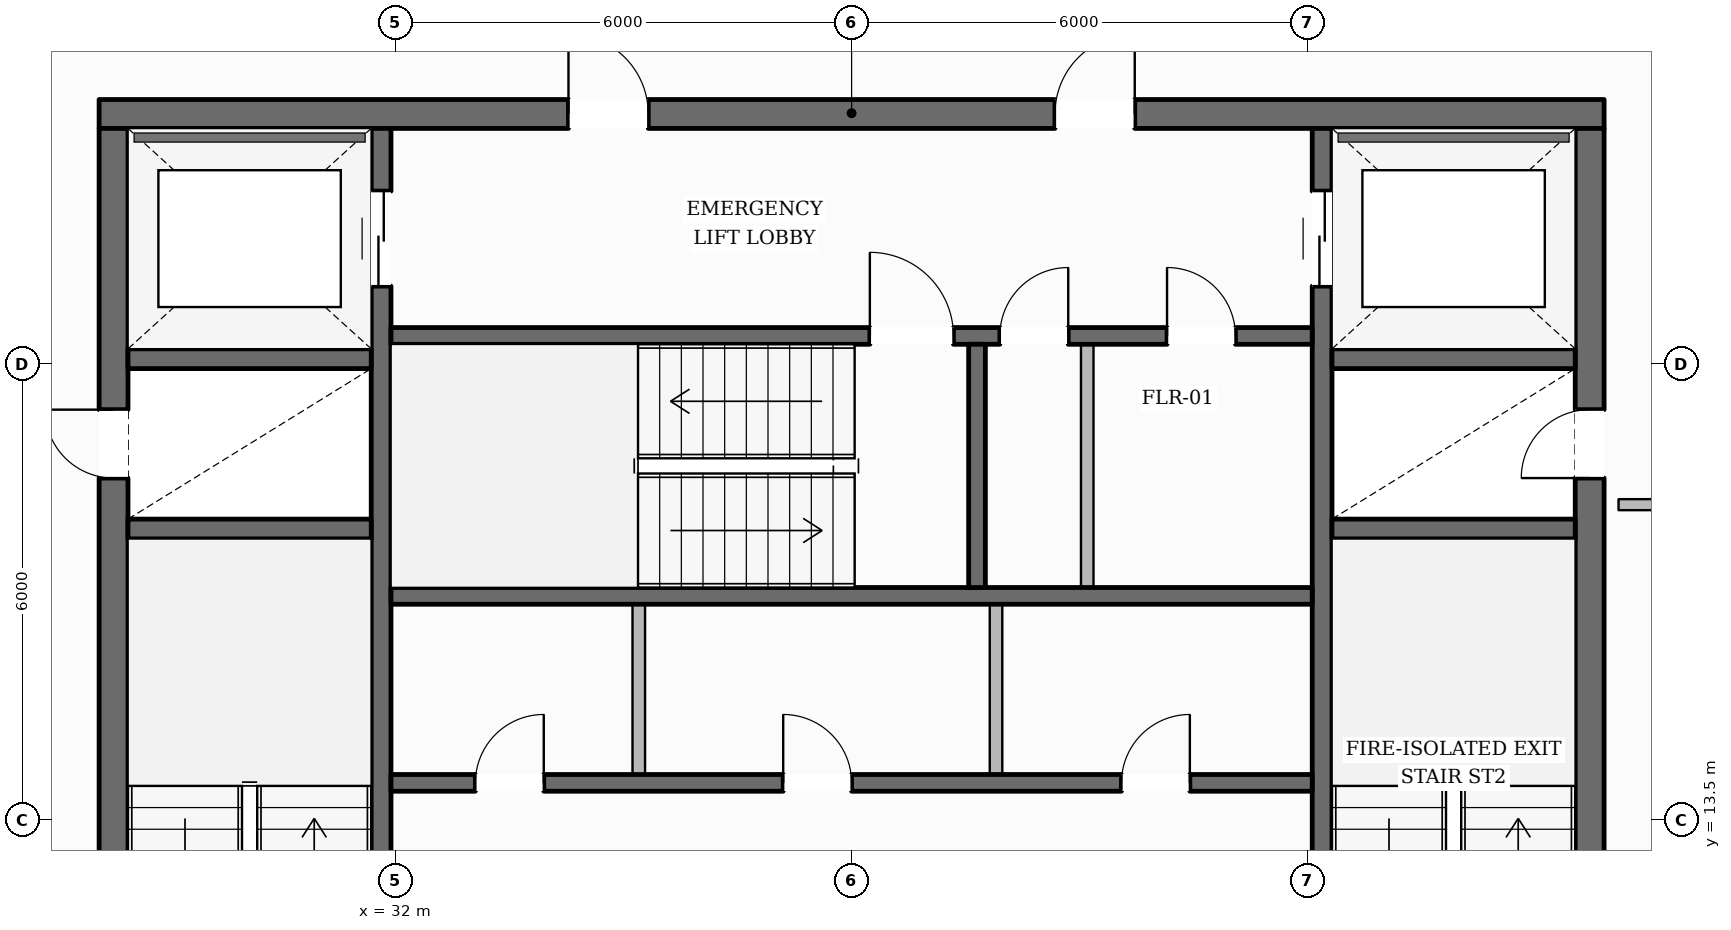
"""IFC4 building model, lengths in metres.
Left out: names, types, materials, properties, quantities, classifications, styles, units other than length and angle.
Written with IfcOpenShell. Run it as: python <this file> out.ifc"""

import sys

from ifc_helpers import new_model, si_unit, direction, frame, frame_2d, origin, place, context, subcontext, project, spatial, rectangle, extrude, element, fill, save


model = new_model("IFC4")
c1 = context("Model", 3, precision=1e-05, world=origin(), true_north=direction((0.0, 1.0)))
c2 = subcontext(c1, "Body", "Model", "MODEL_VIEW")
j1 = project(units=[si_unit("LENGTHUNIT", "METRE"), si_unit("PLANEANGLEUNIT", "RADIAN")], contexts=[c1])
p1 = place(None, origin())
s1 = spatial("IfcSite", under=j1, at=p1, CompositionType="ELEMENT")
p2 = place(p1, origin())
s2 = spatial("IfcBuilding", under=s1, at=p2, CompositionType="ELEMENT")
p3 = place(p2, frame((0.0, 0.0, 278.0)))
s3 = spatial("IfcBuildingStorey", under=s2, at=p3, CompositionType="ELEMENT", Elevation=278.0)
p4 = place(p3, frame((28.1, 22.79, 0.0), z_axis=(0.0, 0.0, 1.0), x_axis=(1.0, 0.0, 0.0)))
e1 = element("IfcWall", 1, at=p4, inside=s3, PredefinedType="SOLIDWALL", context=c2, shape_type="SweptSolid", body=[
    extrude(rectangle(XDim=19.8, YDim=0.38, at=frame_2d((9.9, 0.0))), origin(), (0.0, 0.0, 1.0), 3.61),
])
p5 = place(p4, frame((6.175, 0.0, 0.0)))
e2 = element("IfcOpeningElement", 2, at=p5, cuts=e1, PredefinedType="OPENING", context=c2, shape_type="SweptSolid", body=[
    extrude(rectangle(XDim=1.05, YDim=2.15, at=frame_2d((0.525, 1.075))), frame((0.0, 0.2, 0.0), z_axis=(0.0, -1.0, 0.0), x_axis=(1.0, 0.0, 0.0)), (0.0, 0.0, 1.0), 0.4),
])
p6 = place(p4, frame((12.575, 0.0, 0.0)))
e3 = element("IfcOpeningElement", 3, at=p6, cuts=e1, PredefinedType="OPENING", context=c2, shape_type="SweptSolid", body=[
    extrude(rectangle(XDim=1.05, YDim=2.15, at=frame_2d((0.525, 1.075))), frame((0.0, 0.2, 0.0), z_axis=(0.0, -1.0, 0.0), x_axis=(1.0, 0.0, 0.0)), (0.0, 0.0, 1.0), 0.4),
])
p7 = place(p3, frame((28.29, 9.6, 0.0), z_axis=(0.0, 0.0, 1.0), x_axis=(0.0, 1.0, 0.0)))
e4 = element("IfcWall", 4, at=p7, inside=s3, PredefinedType="SOLIDWALL", context=c2, shape_type="SweptSolid", body=[
    extrude(rectangle(XDim=13.0, YDim=0.38, at=frame_2d((6.5, 0.0))), origin(), (0.0, 0.0, 1.0), 3.61),
])
p8 = place(p7, frame((0.2, 0.0, 0.0)))
e5 = element("IfcOpeningElement", 5, at=p8, cuts=e4, PredefinedType="OPENING", context=c2, shape_type="SweptSolid", body=[
    extrude(rectangle(XDim=1.1, YDim=2.15, at=frame_2d((0.55, 1.075))), frame((0.0, 0.2, 0.0), z_axis=(0.0, -1.0, 0.0), x_axis=(1.0, 0.0, 0.0)), (0.0, 0.0, 1.0), 0.4),
])
p9 = place(p7, frame((8.4, 0.0, 0.0)))
e6 = element("IfcOpeningElement", 6, at=p9, cuts=e4, PredefinedType="OPENING", context=c2, shape_type="SweptSolid", body=[
    extrude(rectangle(XDim=0.9, YDim=2.1, at=frame_2d((0.45, 1.05))), frame((0.0, 0.2, 0.0), z_axis=(0.0, -1.0, 0.0), x_axis=(1.0, 0.0, 0.0)), (0.0, 0.0, 1.0), 0.4),
])
p10 = place(p3, frame((47.71, 9.6, 0.0), z_axis=(0.0, 0.0, 1.0), x_axis=(0.0, 1.0, 0.0)))
e7 = element("IfcWall", 7, at=p10, inside=s3, PredefinedType="SOLIDWALL", context=c2, shape_type="SweptSolid", body=[
    extrude(rectangle(XDim=13.0, YDim=0.38, at=frame_2d((6.5, 0.0))), origin(), (0.0, 0.0, 1.0), 3.61),
])
p11 = place(p10, frame((0.2, 0.0, 0.0)))
e8 = element("IfcOpeningElement", 8, at=p11, cuts=e7, PredefinedType="OPENING", context=c2, shape_type="SweptSolid", body=[
    extrude(rectangle(XDim=1.1, YDim=2.15, at=frame_2d((0.55, 1.075))), frame((0.0, 0.2, 0.0), z_axis=(0.0, -1.0, 0.0), x_axis=(1.0, 0.0, 0.0)), (0.0, 0.0, 1.0), 0.4),
])
p12 = place(p10, frame((8.4, 0.0, 0.0)))
e9 = element("IfcOpeningElement", 9, at=p12, cuts=e7, PredefinedType="OPENING", context=c2, shape_type="SweptSolid", body=[
    extrude(rectangle(XDim=0.9, YDim=2.1, at=frame_2d((0.45, 1.05))), frame((0.0, 0.2, 0.0), z_axis=(0.0, -1.0, 0.0), x_axis=(1.0, 0.0, 0.0)), (0.0, 0.0, 1.0), 0.4),
])
p13 = place(p3, frame((31.81, 9.6, 0.0), z_axis=(0.0, 0.0, 1.0), x_axis=(0.0, 1.0, 0.0)))
e10 = element("IfcWall", 10, at=p13, inside=s3, PredefinedType="SHEAR", context=c2, shape_type="SweptSolid", body=[
    extrude(rectangle(XDim=13.0, YDim=0.26, at=frame_2d((6.5, 0.0))), origin(), (0.0, 0.0, 1.0), 3.61),
])
p14 = place(p13, frame((10.925, 0.0, 0.0)))
e11 = element("IfcOpeningElement", 11, at=p14, cuts=e10, PredefinedType="OPENING", context=c2, shape_type="SweptSolid", body=[
    extrude(rectangle(XDim=1.25, YDim=2.25, at=frame_2d((0.625, 1.125))), frame((0.0, 0.14, 0.0), z_axis=(0.0, -1.0, 0.0), x_axis=(1.0, 0.0, 0.0)), (0.0, 0.0, 1.0), 0.28),
])
p15 = place(p3, frame((44.19, 9.6, 0.0), z_axis=(0.0, 0.0, 1.0), x_axis=(0.0, 1.0, 0.0)))
e12 = element("IfcWall", 12, at=p15, inside=s3, PredefinedType="SHEAR", context=c2, shape_type="SweptSolid", body=[
    extrude(rectangle(XDim=13.0, YDim=0.26, at=frame_2d((6.5, 0.0))), origin(), (0.0, 0.0, 1.0), 3.61),
])
p16 = place(p15, frame((10.925, 0.0, 0.0)))
e13 = element("IfcOpeningElement", 13, at=p16, cuts=e12, PredefinedType="OPENING", context=c2, shape_type="SweptSolid", body=[
    extrude(rectangle(XDim=1.25, YDim=2.25, at=frame_2d((0.625, 1.125))), frame((0.0, 0.14, 0.0), z_axis=(0.0, -1.0, 0.0), x_axis=(1.0, 0.0, 0.0)), (0.0, 0.0, 1.0), 0.28),
])
for number, where, z_axis, x_axis in (
    (14, (28.48, 17.33, 0.0), (0.0, 0.0, 1.0), (1.0, 0.0, 0.0)),
    (15, (28.48, 19.57, 0.0), (0.0, 0.0, 1.0), (1.0, 0.0, 0.0)),
    (16, (44.32, 17.33, 0.0), (0.0, 0.0, 1.0), (1.0, 0.0, 0.0)),
    (17, (44.32, 19.57, 0.0), (0.0, 0.0, 1.0), (1.0, 0.0, 0.0)),
):
    element("IfcWall", number, at=place(p3, frame(where, z_axis=z_axis, x_axis=x_axis)), inside=s3, PredefinedType="SHEAR", context=c2, shape_type="SweptSolid", body=[
        extrude(rectangle(XDim=3.2, YDim=0.26, at=frame_2d((1.6, 0.0))), origin(), (0.0, 0.0, 1.0), 3.61),
    ])
p17 = place(p3, frame((31.94, 19.87, 0.0), z_axis=(0.0, 0.0, 1.0), x_axis=(1.0, 0.0, 0.0)))
e18 = element("IfcWall", 18, at=p17, inside=s3, PredefinedType="SOLIDWALL", context=c2, shape_type="SweptSolid", body=[
    extrude(rectangle(XDim=12.12, YDim=0.22, at=frame_2d((6.06, 0.0))), origin(), (0.0, 0.0, 1.0), 3.61),
])
p18 = place(p17, frame((6.3, 0.0, 0.0)))
e19 = element("IfcOpeningElement", 19, at=p18, cuts=e18, PredefinedType="OPENING", context=c2, shape_type="SweptSolid", body=[
    extrude(rectangle(XDim=1.1, YDim=2.15, at=frame_2d((0.55, 1.075))), frame((0.0, 0.12, 0.0), z_axis=(0.0, -1.0, 0.0), x_axis=(1.0, 0.0, 0.0)), (0.0, 0.0, 1.0), 0.24),
])
p19 = place(p17, frame((8.01, 0.0, 0.0)))
e20 = element("IfcOpeningElement", 20, at=p19, cuts=e18, PredefinedType="OPENING", context=c2, shape_type="SweptSolid", body=[
    extrude(rectangle(XDim=0.9, YDim=2.1, at=frame_2d((0.45, 1.05))), frame((0.0, 0.12, 0.0), z_axis=(0.0, -1.0, 0.0), x_axis=(1.0, 0.0, 0.0)), (0.0, 0.0, 1.0), 0.24),
])
p20 = place(p17, frame((10.21, 0.0, 0.0)))
e21 = element("IfcOpeningElement", 21, at=p20, cuts=e18, PredefinedType="OPENING", context=c2, shape_type="SweptSolid", body=[
    extrude(rectangle(XDim=0.9, YDim=2.1, at=frame_2d((0.45, 1.05))), frame((0.0, 0.12, 0.0), z_axis=(0.0, -1.0, 0.0), x_axis=(1.0, 0.0, 0.0)), (0.0, 0.0, 1.0), 0.24),
])
p21 = place(p3, frame((31.94, 16.45, 0.0), z_axis=(0.0, 0.0, 1.0), x_axis=(1.0, 0.0, 0.0)))
e22 = element("IfcWall", 22, at=p21, inside=s3, PredefinedType="SOLIDWALL", context=c2, shape_type="SweptSolid", body=[
    extrude(rectangle(XDim=12.12, YDim=0.22, at=frame_2d((6.06, 0.0))), origin(), (0.0, 0.0, 1.0), 3.61),
])
p22 = place(p3, frame((39.65, 16.56, 0.0), z_axis=(0.0, 0.0, 1.0), x_axis=(0.0, 1.0, 0.0)))
e23 = element("IfcWall", 23, at=p22, inside=s3, PredefinedType="SOLIDWALL", context=c2, shape_type="SweptSolid", body=[
    extrude(rectangle(XDim=3.2, YDim=0.22, at=frame_2d((1.6, 0.0))), origin(), (0.0, 0.0, 1.0), 3.61),
])
p23 = place(p3, frame((31.94, 13.99, 0.0), z_axis=(0.0, 0.0, 1.0), x_axis=(1.0, 0.0, 0.0)))
e24 = element("IfcWall", 24, at=p23, inside=s3, PredefinedType="SOLIDWALL", context=c2, shape_type="SweptSolid", body=[
    extrude(rectangle(XDim=12.12, YDim=0.22, at=frame_2d((6.06, 0.0))), origin(), (0.0, 0.0, 1.0), 3.61),
])
p24 = place(p23, frame((1.11, 0.0, 0.0)))
e25 = element("IfcOpeningElement", 25, at=p24, cuts=e24, PredefinedType="OPENING", context=c2, shape_type="SweptSolid", body=[
    extrude(rectangle(XDim=0.9, YDim=2.1, at=frame_2d((0.45, 1.05))), frame((0.0, 0.12, 0.0), z_axis=(0.0, -1.0, 0.0), x_axis=(1.0, 0.0, 0.0)), (0.0, 0.0, 1.0), 0.24),
])
p25 = place(p23, frame((5.16, 0.0, 0.0)))
e26 = element("IfcOpeningElement", 26, at=p25, cuts=e24, PredefinedType="OPENING", context=c2, shape_type="SweptSolid", body=[
    extrude(rectangle(XDim=0.9, YDim=2.1, at=frame_2d((0.45, 1.05))), frame((0.0, 0.12, 0.0), z_axis=(0.0, -1.0, 0.0), x_axis=(1.0, 0.0, 0.0)), (0.0, 0.0, 1.0), 0.24),
])
p26 = place(p23, frame((9.61, 0.0, 0.0)))
e27 = element("IfcOpeningElement", 27, at=p26, cuts=e24, PredefinedType="OPENING", context=c2, shape_type="SweptSolid", body=[
    extrude(rectangle(XDim=0.9, YDim=2.1, at=frame_2d((0.45, 1.05))), frame((0.0, 0.12, 0.0), z_axis=(0.0, -1.0, 0.0), x_axis=(1.0, 0.0, 0.0)), (0.0, 0.0, 1.0), 0.24),
])
p27 = place(p3, frame((15.322, 10.186, 0.0), z_axis=(0.0, 0.0, 1.0), x_axis=(0.510014133956, 0.860166020699, 0.0)))
e28 = element("IfcWall", 28, at=p27, inside=s3, PredefinedType="STANDARD", context=c2, shape_type="SweptSolid", body=[
    extrude(rectangle(XDim=38.65, YDim=0.35, at=frame_2d((19.325, 0.0))), origin(), (0.0, 0.0, 1.0), 3.196),
])
p28 = place(p27, frame((34.362, 0.0, 0.65)))
e29 = element("IfcOpeningElement", 29, at=p28, cuts=e28, PredefinedType="OPENING", context=c2, shape_type="SweptSolid", body=[
    extrude(rectangle(XDim=1.35, YDim=1.75, at=frame_2d((0.675, 0.875))), frame((0.0, 0.185, 0.0), z_axis=(0.0, -1.0, 0.0), x_axis=(1.0, 0.0, 0.0)), (0.0, 0.0, 1.0), 0.37),
])
p29 = place(p27, frame((28.08, 0.0, 0.65)))
e30 = element("IfcOpeningElement", 30, at=p29, cuts=e28, PredefinedType="OPENING", context=c2, shape_type="SweptSolid", body=[
    extrude(rectangle(XDim=1.35, YDim=1.75, at=frame_2d((0.675, 0.875))), frame((0.0, 0.185, 0.0), z_axis=(0.0, -1.0, 0.0), x_axis=(1.0, 0.0, 0.0)), (0.0, 0.0, 1.0), 0.37),
])
p30 = place(p27, frame((21.797, 0.0, 0.65)))
e31 = element("IfcOpeningElement", 31, at=p30, cuts=e28, PredefinedType="OPENING", context=c2, shape_type="SweptSolid", body=[
    extrude(rectangle(XDim=1.35, YDim=1.75, at=frame_2d((0.675, 0.875))), frame((0.0, 0.185, 0.0), z_axis=(0.0, -1.0, 0.0), x_axis=(1.0, 0.0, 0.0)), (0.0, 0.0, 1.0), 0.37),
])
p31 = place(p27, frame((9.232, 0.0, 0.65)))
e32 = element("IfcOpeningElement", 32, at=p31, cuts=e28, PredefinedType="OPENING", context=c2, shape_type="SweptSolid", body=[
    extrude(rectangle(XDim=1.35, YDim=1.75, at=frame_2d((0.675, 0.875))), frame((0.0, 0.185, 0.0), z_axis=(0.0, -1.0, 0.0), x_axis=(1.0, 0.0, 0.0)), (0.0, 0.0, 1.0), 0.37),
])
p32 = place(p27, frame((2.949, 0.0, 0.65)))
e33 = element("IfcOpeningElement", 33, at=p32, cuts=e28, PredefinedType="OPENING", context=c2, shape_type="SweptSolid", body=[
    extrude(rectangle(XDim=1.35, YDim=1.75, at=frame_2d((0.675, 0.875))), frame((0.0, 0.185, 0.0), z_axis=(0.0, -1.0, 0.0), x_axis=(1.0, 0.0, 0.0)), (0.0, 0.0, 1.0), 0.37),
])
p33 = place(p3, frame((40.917, 43.461, 0.0), z_axis=(0.0, 0.0, 1.0), x_axis=(0.506204788728, -0.862413306872, 0.0)))
e34 = element("IfcWall", 34, at=p33, inside=s3, PredefinedType="STANDARD", context=c2, shape_type="SweptSolid", body=[
    extrude(rectangle(XDim=38.352, YDim=0.35, at=frame_2d((19.176, 0.0))), origin(), (0.0, 0.0, 1.0), 3.196),
])
p34 = place(p33, frame((9.188, 0.0, 0.0)))
e35 = element("IfcOpeningElement", 35, at=p34, cuts=e34, PredefinedType="OPENING", context=c2, shape_type="SweptSolid", body=[
    extrude(rectangle(XDim=1.0, YDim=2.2, at=frame_2d((0.5, 1.1))), frame((0.0, 0.185, 0.0), z_axis=(0.0, -1.0, 0.0), x_axis=(1.0, 0.0, 0.0)), (0.0, 0.0, 1.0), 0.37),
])
p35 = place(p33, frame((34.078, 0.0, 0.65)))
e36 = element("IfcOpeningElement", 36, at=p35, cuts=e34, PredefinedType="OPENING", context=c2, shape_type="SweptSolid", body=[
    extrude(rectangle(XDim=1.35, YDim=1.75, at=frame_2d((0.675, 0.875))), frame((0.0, 0.185, 0.0), z_axis=(0.0, -1.0, 0.0), x_axis=(1.0, 0.0, 0.0)), (0.0, 0.0, 1.0), 0.37),
])
p36 = place(p33, frame((27.846, 0.0, 0.65)))
e37 = element("IfcOpeningElement", 37, at=p36, cuts=e34, PredefinedType="OPENING", context=c2, shape_type="SweptSolid", body=[
    extrude(rectangle(XDim=1.35, YDim=1.75, at=frame_2d((0.675, 0.875))), frame((0.0, 0.185, 0.0), z_axis=(0.0, -1.0, 0.0), x_axis=(1.0, 0.0, 0.0)), (0.0, 0.0, 1.0), 0.37),
])
p37 = place(p33, frame((21.614, 0.0, 0.65)))
e38 = element("IfcOpeningElement", 38, at=p37, cuts=e34, PredefinedType="OPENING", context=c2, shape_type="SweptSolid", body=[
    extrude(rectangle(XDim=1.35, YDim=1.75, at=frame_2d((0.675, 0.875))), frame((0.0, 0.185, 0.0), z_axis=(0.0, -1.0, 0.0), x_axis=(1.0, 0.0, 0.0)), (0.0, 0.0, 1.0), 0.37),
])
p38 = place(p33, frame((2.917, 0.0, 0.65)))
e39 = element("IfcOpeningElement", 39, at=p38, cuts=e34, PredefinedType="OPENING", context=c2, shape_type="SweptSolid", body=[
    extrude(rectangle(XDim=1.35, YDim=1.75, at=frame_2d((0.675, 0.875))), frame((0.0, 0.185, 0.0), z_axis=(0.0, -1.0, 0.0), x_axis=(1.0, 0.0, 0.0)), (0.0, 0.0, 1.0), 0.37),
])
for number, where, z_axis, x_axis in (
    (40, (35.2, 14.1, 0.0), (0.0, 0.0, 1.0), (0.0, 1.0, 0.0)),
    (41, (39.9, 14.1, 0.0), (0.0, 0.0, 1.0), (0.0, 1.0, 0.0)),
):
    element("IfcWall", number, at=place(p3, frame(where, z_axis=z_axis, x_axis=x_axis)), inside=s3, PredefinedType="PARTITIONING", context=c2, shape_type="SweptSolid", body=[
        extrude(rectangle(XDim=2.24, YDim=0.165, at=frame_2d((1.12, 0.0))), origin(), (0.0, 0.0, 1.0), 3.61),
    ])
p39 = place(p3, frame((41.1, 16.56, 0.0), z_axis=(0.0, 0.0, 1.0), x_axis=(0.0, 1.0, 0.0)))
e42 = element("IfcWall", 42, at=p39, inside=s3, PredefinedType="PARTITIONING", context=c2, shape_type="SweptSolid", body=[
    extrude(rectangle(XDim=3.2, YDim=0.165, at=frame_2d((1.6, 0.0))), origin(), (0.0, 0.0, 1.0), 3.61),
])
p40 = place(p3, frame((49.91, 17.65, 0.0), z_axis=(0.0, 0.0, 1.0), x_axis=(-1.0, 0.0, 0.0)))
e43 = element("IfcWall", 43, at=p40, inside=s3, PredefinedType="PARTITIONING", context=c2, shape_type="SweptSolid", body=[
    extrude(rectangle(XDim=1.82, YDim=0.145, at=frame_2d((0.91, 0.0))), origin(), (0.0, 0.0, 1.0), 3.61),
])
p41 = place(p18, origin())
e44 = element("IfcDoor", 44, at=p41, inside=s3, OperationType="SINGLE_SWING_LEFT", PredefinedType="DOOR", context=c2, shape_type="SweptSolid", body=[
    extrude(rectangle(XDim=1.1, YDim=2.15, at=frame_2d((0.55, 1.075))), frame((0.0, 0.025, 0.0), z_axis=(0.0, -1.0, 0.0), x_axis=(1.0, 0.0, 0.0)), (0.0, 0.0, 1.0), 0.05),
])
fill(e19, e44)
p42 = place(p9, origin())
e45 = element("IfcDoor", 45, at=p42, inside=s3, OperationType="SINGLE_SWING_RIGHT", PredefinedType="DOOR", context=c2, shape_type="SweptSolid", body=[
    extrude(rectangle(XDim=0.9, YDim=2.1, at=frame_2d((0.45, 1.05))), frame((0.0, 0.025, 0.0), z_axis=(0.0, -1.0, 0.0), x_axis=(1.0, 0.0, 0.0)), (0.0, 0.0, 1.0), 0.05),
])
fill(e6, e45)
p43 = place(p12, origin())
e46 = element("IfcDoor", 46, at=p43, inside=s3, OperationType="SINGLE_SWING_LEFT", PredefinedType="DOOR", context=c2, shape_type="SweptSolid", body=[
    extrude(rectangle(XDim=0.9, YDim=2.1, at=frame_2d((0.45, 1.05))), frame((0.0, 0.025, 0.0), z_axis=(0.0, -1.0, 0.0), x_axis=(1.0, 0.0, 0.0)), (0.0, 0.0, 1.0), 0.05),
])
fill(e9, e46)
p44 = place(p5, origin())
e47 = element("IfcDoor", 47, at=p44, inside=s3, OperationType="SINGLE_SWING_LEFT", PredefinedType="DOOR", context=c2, shape_type="SweptSolid", body=[
    extrude(rectangle(XDim=1.05, YDim=2.15, at=frame_2d((0.525, 1.075))), frame((0.0, 0.025, 0.0), z_axis=(0.0, -1.0, 0.0), x_axis=(1.0, 0.0, 0.0)), (0.0, 0.0, 1.0), 0.05),
])
fill(e2, e47)
p45 = place(p6, origin())
e48 = element("IfcDoor", 48, at=p45, inside=s3, OperationType="SINGLE_SWING_RIGHT", PredefinedType="DOOR", context=c2, shape_type="SweptSolid", body=[
    extrude(rectangle(XDim=1.05, YDim=2.15, at=frame_2d((0.525, 1.075))), frame((0.0, 0.025, 0.0), z_axis=(0.0, -1.0, 0.0), x_axis=(1.0, 0.0, 0.0)), (0.0, 0.0, 1.0), 0.05),
])
fill(e3, e48)
p46 = place(p14, origin())
e49 = element("IfcDoor", 49, at=p46, inside=s3, OperationType="DOUBLE_DOOR_SLIDING", PredefinedType="DOOR", context=c2, shape_type="SweptSolid", body=[
    extrude(rectangle(XDim=1.25, YDim=2.25, at=frame_2d((0.625, 1.125))), frame((0.0, 0.025, 0.0), z_axis=(0.0, -1.0, 0.0), x_axis=(1.0, 0.0, 0.0)), (0.0, 0.0, 1.0), 0.05),
])
fill(e11, e49)
p47 = place(p16, origin())
e50 = element("IfcDoor", 50, at=p47, inside=s3, OperationType="DOUBLE_DOOR_SLIDING", PredefinedType="DOOR", context=c2, shape_type="SweptSolid", body=[
    extrude(rectangle(XDim=1.25, YDim=2.25, at=frame_2d((0.625, 1.125))), frame((0.0, 0.025, 0.0), z_axis=(0.0, -1.0, 0.0), x_axis=(1.0, 0.0, 0.0)), (0.0, 0.0, 1.0), 0.05),
])
fill(e13, e50)
p48 = place(p24, origin())
e51 = element("IfcDoor", 51, at=p48, inside=s3, OperationType="SINGLE_SWING_RIGHT", PredefinedType="DOOR", context=c2, shape_type="SweptSolid", body=[
    extrude(rectangle(XDim=0.9, YDim=2.1, at=frame_2d((0.45, 1.05))), frame((0.0, 0.025, 0.0), z_axis=(0.0, -1.0, 0.0), x_axis=(1.0, 0.0, 0.0)), (0.0, 0.0, 1.0), 0.05),
])
fill(e25, e51)
p49 = place(p25, origin())
e52 = element("IfcDoor", 52, at=p49, inside=s3, OperationType="SINGLE_SWING_LEFT", PredefinedType="DOOR", context=c2, shape_type="SweptSolid", body=[
    extrude(rectangle(XDim=0.9, YDim=2.1, at=frame_2d((0.45, 1.05))), frame((0.0, 0.025, 0.0), z_axis=(0.0, -1.0, 0.0), x_axis=(1.0, 0.0, 0.0)), (0.0, 0.0, 1.0), 0.05),
])
fill(e26, e52)
p50 = place(p26, origin())
e53 = element("IfcDoor", 53, at=p50, inside=s3, OperationType="SINGLE_SWING_RIGHT", PredefinedType="DOOR", context=c2, shape_type="SweptSolid", body=[
    extrude(rectangle(XDim=0.9, YDim=2.1, at=frame_2d((0.45, 1.05))), frame((0.0, 0.025, 0.0), z_axis=(0.0, -1.0, 0.0), x_axis=(1.0, 0.0, 0.0)), (0.0, 0.0, 1.0), 0.05),
])
fill(e27, e53)
p51 = place(p19, origin())
e54 = element("IfcDoor", 54, at=p51, inside=s3, OperationType="SINGLE_SWING_RIGHT", PredefinedType="DOOR", context=c2, shape_type="SweptSolid", body=[
    extrude(rectangle(XDim=0.9, YDim=2.1, at=frame_2d((0.45, 1.05))), frame((0.0, 0.025, 0.0), z_axis=(0.0, -1.0, 0.0), x_axis=(1.0, 0.0, 0.0)), (0.0, 0.0, 1.0), 0.05),
])
fill(e20, e54)
p52 = place(p20, origin())
e55 = element("IfcDoor", 55, at=p52, inside=s3, OperationType="SINGLE_SWING_LEFT", PredefinedType="DOOR", context=c2, shape_type="SweptSolid", body=[
    extrude(rectangle(XDim=0.9, YDim=2.1, at=frame_2d((0.45, 1.05))), frame((0.0, 0.025, 0.0), z_axis=(0.0, -1.0, 0.0), x_axis=(1.0, 0.0, 0.0)), (0.0, 0.0, 1.0), 0.05),
])
fill(e21, e55)
save(model, sys.argv[1])
